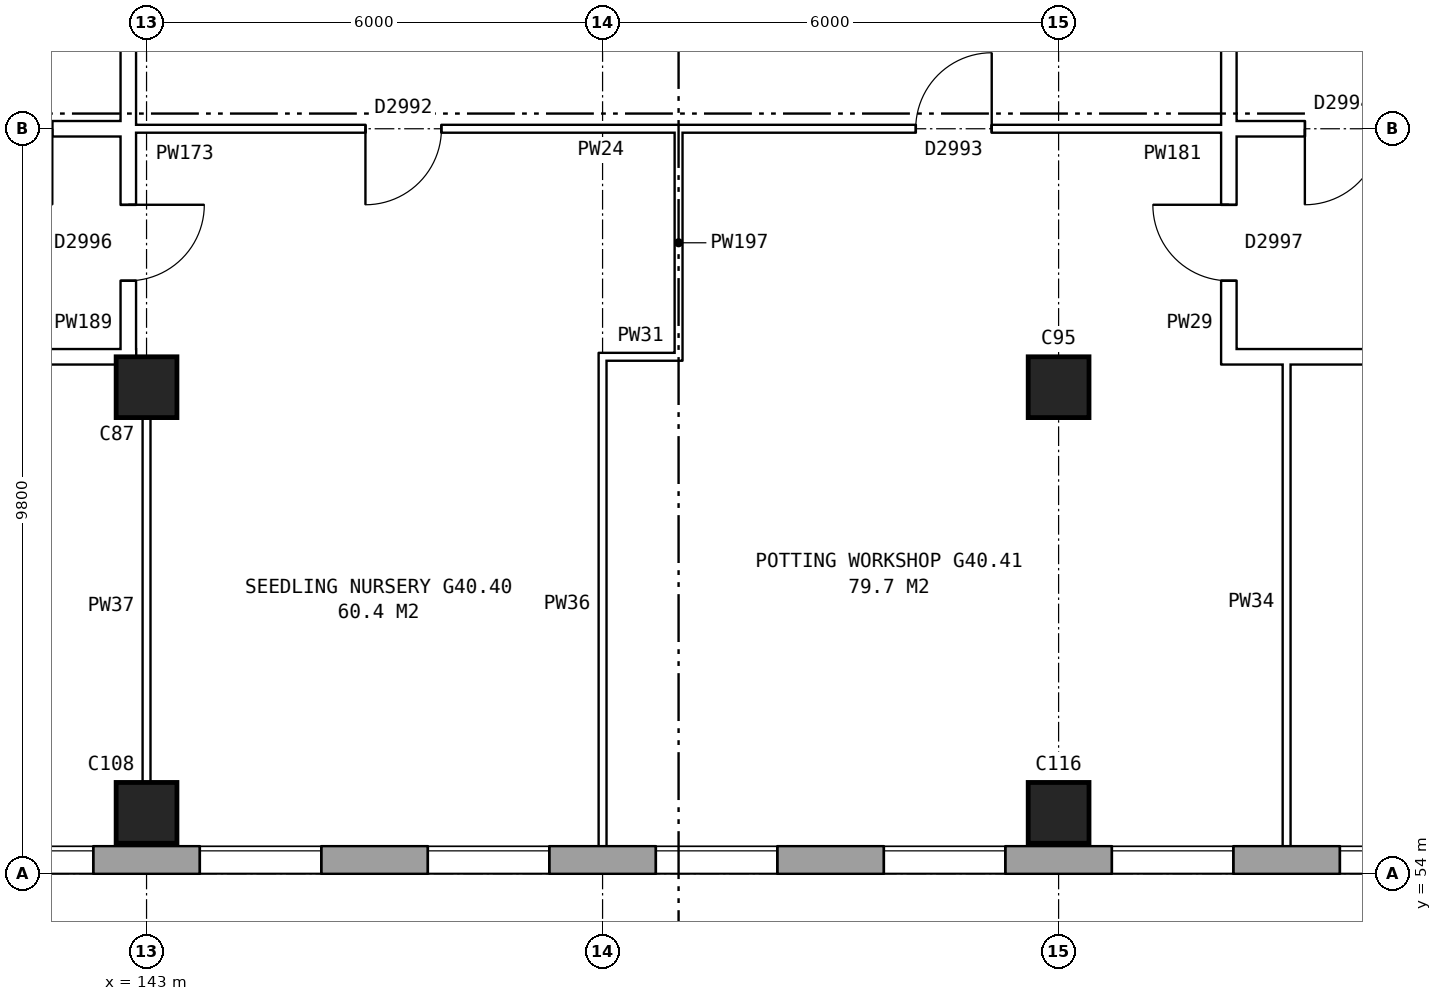
"""IFC4 building model, lengths in metres.
Left out: names, types, materials, properties, quantities, classifications, styles, units other than length and angle.
Written with IfcOpenShell. Run it as: python <this file> out.ifc"""

import sys

from ifc_helpers import new_model, si_unit, direction, frame, frame_2d, origin, origin_2d, place, context, subcontext, project, spatial, rectangle, extrude, element, fill, save


model = new_model("IFC4")
c1 = context("Model", 3, precision=1e-05, world=origin(), true_north=direction((0.0, 1.0)))
c2 = subcontext(c1, "Body", "Model", "MODEL_VIEW")
j1 = project(units=[si_unit("LENGTHUNIT", "METRE"), si_unit("PLANEANGLEUNIT", "RADIAN")], contexts=[c1])
p1 = place(None, origin())
s1 = spatial("IfcSite", under=j1, at=p1, CompositionType="ELEMENT")
p2 = place(p1, origin())
s2 = spatial("IfcBuilding", under=s1, at=p2, CompositionType="ELEMENT")
p3 = place(p2, frame((0.0, 0.0, 142.3)))
s3 = spatial("IfcBuildingStorey", under=s2, at=p3, CompositionType="ELEMENT", Elevation=142.3)
for number, where, z_axis, x_axis in (
    (1, (143.0, 54.8, 0.0), (0.0, 0.0, 1.0), (1.0, 0.0, 0.0)),
    (2, (143.0, 60.4, 0.0), (0.0, 0.0, 1.0), (1.0, 0.0, 0.0)),
    (3, (155.0, 54.8, 0.0), (0.0, 0.0, 1.0), (1.0, 0.0, 0.0)),
    (4, (155.0, 60.4, 0.0), (0.0, 0.0, 1.0), (1.0, 0.0, 0.0)),
):
    element("IfcColumn", number, at=place(p3, frame(where, z_axis=z_axis, x_axis=x_axis)), inside=s3, PredefinedType="COLUMN", context=c2, shape_type="SweptSolid", body=[
        extrude(rectangle(XDim=0.8, YDim=0.8, at=origin_2d()), origin(), (0.0, 0.0, 1.0), 5.6),
    ])
p4 = place(p3, frame((134.075, 54.18, 0.0), z_axis=(0.0, 0.0, 1.0), x_axis=(1.0, 0.0, 0.0)))
e5 = element("IfcWall", 5, at=p4, inside=s3, PredefinedType="STANDARD", context=c2, shape_type="SweptSolid", body=[
    extrude(rectangle(XDim=34.351, YDim=0.36, at=frame_2d((17.175, 0.0))), origin(), (0.0, 0.0, 1.0), 5.6),
])
p5 = place(p4, frame((0.625, 0.0, 0.15)))
e6 = element("IfcOpeningElement", 6, at=p5, cuts=e5, PredefinedType="OPENING", context=c2, shape_type="SweptSolid", body=[
    extrude(rectangle(XDim=1.6, YDim=2.4, at=frame_2d((0.8, 1.2))), frame((0.0, 0.19, 0.0), z_axis=(0.0, -1.0, 0.0), x_axis=(1.0, 0.0, 0.0)), (0.0, 0.0, 1.0), 0.38),
])
p6 = place(p4, frame((3.625, 0.0, 0.15)))
e7 = element("IfcOpeningElement", 7, at=p6, cuts=e5, PredefinedType="OPENING", context=c2, shape_type="SweptSolid", body=[
    extrude(rectangle(XDim=1.6, YDim=2.4, at=frame_2d((0.8, 1.2))), frame((0.0, 0.19, 0.0), z_axis=(0.0, -1.0, 0.0), x_axis=(1.0, 0.0, 0.0)), (0.0, 0.0, 1.0), 0.38),
])
p7 = place(p4, frame((6.625, 0.0, 0.15)))
e8 = element("IfcOpeningElement", 8, at=p7, cuts=e5, PredefinedType="OPENING", context=c2, shape_type="SweptSolid", body=[
    extrude(rectangle(XDim=1.6, YDim=2.4, at=frame_2d((0.8, 1.2))), frame((0.0, 0.19, 0.0), z_axis=(0.0, -1.0, 0.0), x_axis=(1.0, 0.0, 0.0)), (0.0, 0.0, 1.0), 0.38),
])
p8 = place(p4, frame((9.625, 0.0, 0.15)))
e9 = element("IfcOpeningElement", 9, at=p8, cuts=e5, PredefinedType="OPENING", context=c2, shape_type="SweptSolid", body=[
    extrude(rectangle(XDim=1.6, YDim=2.4, at=frame_2d((0.8, 1.2))), frame((0.0, 0.19, 0.0), z_axis=(0.0, -1.0, 0.0), x_axis=(1.0, 0.0, 0.0)), (0.0, 0.0, 1.0), 0.38),
])
p9 = place(p4, frame((12.625, 0.0, 0.15)))
e10 = element("IfcOpeningElement", 10, at=p9, cuts=e5, PredefinedType="OPENING", context=c2, shape_type="SweptSolid", body=[
    extrude(rectangle(XDim=1.6, YDim=2.4, at=frame_2d((0.8, 1.2))), frame((0.0, 0.19, 0.0), z_axis=(0.0, -1.0, 0.0), x_axis=(1.0, 0.0, 0.0)), (0.0, 0.0, 1.0), 0.38),
])
p10 = place(p4, frame((15.625, 0.0, 0.15)))
e11 = element("IfcOpeningElement", 11, at=p10, cuts=e5, PredefinedType="OPENING", context=c2, shape_type="SweptSolid", body=[
    extrude(rectangle(XDim=1.6, YDim=2.4, at=frame_2d((0.8, 1.2))), frame((0.0, 0.19, 0.0), z_axis=(0.0, -1.0, 0.0), x_axis=(1.0, 0.0, 0.0)), (0.0, 0.0, 1.0), 0.38),
])
p11 = place(p4, frame((18.625, 0.0, 0.15)))
e12 = element("IfcOpeningElement", 12, at=p11, cuts=e5, PredefinedType="OPENING", context=c2, shape_type="SweptSolid", body=[
    extrude(rectangle(XDim=1.6, YDim=2.4, at=frame_2d((0.8, 1.2))), frame((0.0, 0.19, 0.0), z_axis=(0.0, -1.0, 0.0), x_axis=(1.0, 0.0, 0.0)), (0.0, 0.0, 1.0), 0.38),
])
p12 = place(p4, frame((21.625, 0.0, 0.15)))
e13 = element("IfcOpeningElement", 13, at=p12, cuts=e5, PredefinedType="OPENING", context=c2, shape_type="SweptSolid", body=[
    extrude(rectangle(XDim=1.6, YDim=2.4, at=frame_2d((0.8, 1.2))), frame((0.0, 0.19, 0.0), z_axis=(0.0, -1.0, 0.0), x_axis=(1.0, 0.0, 0.0)), (0.0, 0.0, 1.0), 0.38),
])
p13 = place(p4, frame((24.625, 0.0, 0.15)))
e14 = element("IfcOpeningElement", 14, at=p13, cuts=e5, PredefinedType="OPENING", context=c2, shape_type="SweptSolid", body=[
    extrude(rectangle(XDim=1.6, YDim=2.4, at=frame_2d((0.8, 1.2))), frame((0.0, 0.19, 0.0), z_axis=(0.0, -1.0, 0.0), x_axis=(1.0, 0.0, 0.0)), (0.0, 0.0, 1.0), 0.38),
])
p14 = place(p4, frame((27.625, 0.0, 0.15)))
e15 = element("IfcOpeningElement", 15, at=p14, cuts=e5, PredefinedType="OPENING", context=c2, shape_type="SweptSolid", body=[
    extrude(rectangle(XDim=1.6, YDim=2.4, at=frame_2d((0.8, 1.2))), frame((0.0, 0.19, 0.0), z_axis=(0.0, -1.0, 0.0), x_axis=(1.0, 0.0, 0.0)), (0.0, 0.0, 1.0), 0.38),
])
p15 = place(p4, frame((30.625, 0.0, 0.15)))
e16 = element("IfcOpeningElement", 16, at=p15, cuts=e5, PredefinedType="OPENING", context=c2, shape_type="SweptSolid", body=[
    extrude(rectangle(XDim=1.6, YDim=2.4, at=frame_2d((0.8, 1.2))), frame((0.0, 0.19, 0.0), z_axis=(0.0, -1.0, 0.0), x_axis=(1.0, 0.0, 0.0)), (0.0, 0.0, 1.0), 0.38),
])
p16 = place(p3, frame((142.76, 63.9, 0.0), z_axis=(0.0, 0.0, 1.0), x_axis=(0.0, 1.0, 0.0)))
e17 = element("IfcWall", 17, at=p16, inside=s3, PredefinedType="PARTITIONING", context=c2, shape_type="SweptSolid", body=[
    extrude(rectangle(XDim=12.2, YDim=0.2, at=frame_2d((6.1, 0.0))), origin(), (0.0, 0.0, 1.0), 5.6),
])
p17 = place(p16, frame((5.1, 0.0, 0.0)))
e18 = element("IfcOpeningElement", 18, at=p17, cuts=e17, PredefinedType="OPENING", context=c2, shape_type="SweptSolid", body=[
    extrude(rectangle(XDim=2.0, YDim=2.1, at=frame_2d((1.0, 1.05))), frame((0.0, 0.11, 0.0), z_axis=(0.0, -1.0, 0.0), x_axis=(1.0, 0.0, 0.0)), (0.0, 0.0, 1.0), 0.22),
])
p18 = place(p3, frame((157.24, 63.9, 0.0), z_axis=(0.0, 0.0, 1.0), x_axis=(0.0, 1.0, 0.0)))
e19 = element("IfcWall", 19, at=p18, inside=s3, PredefinedType="PARTITIONING", context=c2, shape_type="SweptSolid", body=[
    extrude(rectangle(XDim=12.2, YDim=0.2, at=frame_2d((6.1, 0.0))), origin(), (0.0, 0.0, 1.0), 5.6),
])
p19 = place(p18, frame((5.1, 0.0, 0.0)))
e20 = element("IfcOpeningElement", 20, at=p19, cuts=e19, PredefinedType="OPENING", context=c2, shape_type="SweptSolid", body=[
    extrude(rectangle(XDim=2.0, YDim=2.1, at=frame_2d((1.0, 1.05))), frame((0.0, 0.11, 0.0), z_axis=(0.0, -1.0, 0.0), x_axis=(1.0, 0.0, 0.0)), (0.0, 0.0, 1.0), 0.22),
])
p20 = place(p3, frame((131.24, 60.8, 0.0), z_axis=(0.0, 0.0, 1.0), x_axis=(1.0, 0.0, 0.0)))
e21 = element("IfcWall", 21, at=p20, inside=s3, PredefinedType="PARTITIONING", context=c2, shape_type="SweptSolid", body=[
    extrude(rectangle(XDim=11.622, YDim=0.2, at=frame_2d((5.811, 0.0))), origin(), (0.0, 0.0, 1.0), 5.6),
])
p21 = place(p20, frame((2.44, 0.0, 0.0)))
e22 = element("IfcOpeningElement", 22, at=p21, cuts=e21, PredefinedType="OPENING", context=c2, shape_type="SweptSolid", body=[
    extrude(rectangle(XDim=1.0, YDim=2.1, at=frame_2d((0.5, 1.05))), frame((0.0, 0.11, 0.0), z_axis=(0.0, -1.0, 0.0), x_axis=(1.0, 0.0, 0.0)), (0.0, 0.0, 1.0), 0.22),
])
p22 = place(p20, frame((8.141, 0.0, 0.0)))
e23 = element("IfcOpeningElement", 23, at=p22, cuts=e21, PredefinedType="OPENING", context=c2, shape_type="SweptSolid", body=[
    extrude(rectangle(XDim=1.0, YDim=2.1, at=frame_2d((0.5, 1.05))), frame((0.0, 0.11, 0.0), z_axis=(0.0, -1.0, 0.0), x_axis=(1.0, 0.0, 0.0)), (0.0, 0.0, 1.0), 0.22),
])
p23 = place(p3, frame((157.14, 60.8, 0.0), z_axis=(0.0, 0.0, 1.0), x_axis=(1.0, 0.0, 0.0)))
e24 = element("IfcWall", 24, at=p23, inside=s3, PredefinedType="PARTITIONING", context=c2, shape_type="SweptSolid", body=[
    extrude(rectangle(XDim=14.12, YDim=0.2, at=frame_2d((7.06, 0.0))), origin(), (0.0, 0.0, 1.0), 5.6),
])
p24 = place(p23, frame((3.36, 0.0, 0.0)))
e25 = element("IfcOpeningElement", 25, at=p24, cuts=e24, PredefinedType="OPENING", context=c2, shape_type="SweptSolid", body=[
    extrude(rectangle(XDim=1.0, YDim=2.1, at=frame_2d((0.5, 1.05))), frame((0.0, 0.11, 0.0), z_axis=(0.0, -1.0, 0.0), x_axis=(1.0, 0.0, 0.0)), (0.0, 0.0, 1.0), 0.22),
])
p25 = place(p23, frame((10.63, 0.0, 0.0)))
e26 = element("IfcOpeningElement", 26, at=p25, cuts=e24, PredefinedType="OPENING", context=c2, shape_type="SweptSolid", body=[
    extrude(rectangle(XDim=1.0, YDim=2.1, at=frame_2d((0.5, 1.05))), frame((0.0, 0.11, 0.0), z_axis=(0.0, -1.0, 0.0), x_axis=(1.0, 0.0, 0.0)), (0.0, 0.0, 1.0), 0.22),
])
p26 = place(p3, frame((148.95, 60.8, 0.0), z_axis=(0.0, 0.0, 1.0), x_axis=(1.0, 0.0, 0.0)))
e27 = element("IfcWall", 27, at=p26, inside=s3, PredefinedType="PARTITIONING", context=c2, shape_type="SweptSolid", body=[
    extrude(rectangle(XDim=1.1, YDim=0.1, at=frame_2d((0.55, 0.0))), origin(), (0.0, 0.0, 1.0), 5.6),
])
p27 = place(p3, frame((139.76, 63.8, 0.0), z_axis=(0.0, 0.0, 1.0), x_axis=(1.0, 0.0, 0.0)))
e28 = element("IfcWall", 28, at=p27, inside=s3, PredefinedType="PARTITIONING", context=c2, shape_type="SweptSolid", body=[
    extrude(rectangle(XDim=3.1, YDim=0.2, at=frame_2d((1.55, 0.0))), origin(), (0.0, 0.0, 1.0), 5.6),
])
p28 = place(p27, frame((1.0, 0.0, 0.0)))
e29 = element("IfcOpeningElement", 29, at=p28, cuts=e28, PredefinedType="OPENING", context=c2, shape_type="SweptSolid", body=[
    extrude(rectangle(XDim=1.0, YDim=2.1, at=frame_2d((0.5, 1.05))), frame((0.0, 0.11, 0.0), z_axis=(0.0, -1.0, 0.0), x_axis=(1.0, 0.0, 0.0)), (0.0, 0.0, 1.0), 0.22),
])
p29 = place(p3, frame((157.14, 63.8, 0.0), z_axis=(0.0, 0.0, 1.0), x_axis=(1.0, 0.0, 0.0)))
e30 = element("IfcWall", 30, at=p29, inside=s3, PredefinedType="PARTITIONING", context=c2, shape_type="SweptSolid", body=[
    extrude(rectangle(XDim=3.1, YDim=0.2, at=frame_2d((1.55, 0.0))), origin(), (0.0, 0.0, 1.0), 5.6),
])
p30 = place(p29, frame((1.1, 0.0, 0.0)))
e31 = element("IfcOpeningElement", 31, at=p30, cuts=e30, PredefinedType="OPENING", context=c2, shape_type="SweptSolid", body=[
    extrude(rectangle(XDim=1.0, YDim=2.1, at=frame_2d((0.5, 1.05))), frame((0.0, 0.11, 0.0), z_axis=(0.0, -1.0, 0.0), x_axis=(1.0, 0.0, 0.0)), (0.0, 0.0, 1.0), 0.22),
])
p31 = place(p3, frame((142.66, 63.8, 0.0), z_axis=(0.0, 0.0, 1.0), x_axis=(1.0, 0.0, 0.0)))
e32 = element("IfcWall", 32, at=p31, inside=s3, PredefinedType="PARTITIONING", context=c2, shape_type="SweptSolid", body=[
    extrude(rectangle(XDim=14.68, YDim=0.1, at=frame_2d((7.34, 0.0))), origin(), (0.0, 0.0, 1.0), 5.6),
])
p32 = place(p31, frame((3.22, 0.0, 0.0)))
e33 = element("IfcOpeningElement", 33, at=p32, cuts=e32, PredefinedType="OPENING", context=c2, shape_type="SweptSolid", body=[
    extrude(rectangle(XDim=1.0, YDim=2.1, at=frame_2d((0.5, 1.05))), frame((0.0, 0.06, 0.0), z_axis=(0.0, -1.0, 0.0), x_axis=(1.0, 0.0, 0.0)), (0.0, 0.0, 1.0), 0.12),
])
p33 = place(p31, frame((10.46, 0.0, 0.0)))
e34 = element("IfcOpeningElement", 34, at=p33, cuts=e32, PredefinedType="OPENING", context=c2, shape_type="SweptSolid", body=[
    extrude(rectangle(XDim=1.0, YDim=2.1, at=frame_2d((0.5, 1.05))), frame((0.0, 0.06, 0.0), z_axis=(0.0, -1.0, 0.0), x_axis=(1.0, 0.0, 0.0)), (0.0, 0.0, 1.0), 0.12),
])
p34 = place(p3, frame((142.76, 60.7, 0.0), z_axis=(0.0, 0.0, 1.0), x_axis=(0.0, 1.0, 0.0)))
e35 = element("IfcWall", 35, at=p34, inside=s3, PredefinedType="PARTITIONING", context=c2, shape_type="SweptSolid", body=[
    extrude(rectangle(XDim=3.2, YDim=0.2, at=frame_2d((1.6, 0.0))), origin(), (0.0, 0.0, 1.0), 5.6),
])
p35 = place(p34, frame((1.1, 0.0, 0.0)))
e36 = element("IfcOpeningElement", 36, at=p35, cuts=e35, PredefinedType="OPENING", context=c2, shape_type="SweptSolid", body=[
    extrude(rectangle(XDim=1.0, YDim=2.1, at=frame_2d((0.5, 1.05))), frame((0.0, 0.11, 0.0), z_axis=(0.0, -1.0, 0.0), x_axis=(1.0, 0.0, 0.0)), (0.0, 0.0, 1.0), 0.22),
])
p36 = place(p3, frame((143.0, 54.24, 0.0), z_axis=(0.0, 0.0, 1.0), x_axis=(0.0, 1.0, 0.0)))
e37 = element("IfcWall", 37, at=p36, inside=s3, PredefinedType="PARTITIONING", context=c2, shape_type="SweptSolid", body=[
    extrude(rectangle(XDim=6.56, YDim=0.1, at=frame_2d((3.28, 0.0))), origin(), (0.0, 0.0, 1.0), 5.6),
])
p37 = place(p3, frame((149.0, 54.24, 0.0), z_axis=(0.0, 0.0, 1.0), x_axis=(0.0, 1.0, 0.0)))
e38 = element("IfcWall", 38, at=p37, inside=s3, PredefinedType="PARTITIONING", context=c2, shape_type="SweptSolid", body=[
    extrude(rectangle(XDim=6.61, YDim=0.1, at=frame_2d((3.305, 0.0))), origin(), (0.0, 0.0, 1.0), 5.6),
])
p38 = place(p3, frame((150.0, 60.75, 0.0), z_axis=(0.0, 0.0, 1.0), x_axis=(0.0, 1.0, 0.0)))
e39 = element("IfcWall", 39, at=p38, inside=s3, PredefinedType="PARTITIONING", context=c2, shape_type="SweptSolid", body=[
    extrude(rectangle(XDim=3.1, YDim=0.1, at=frame_2d((1.55, 0.0))), origin(), (0.0, 0.0, 1.0), 5.6),
])
p39 = place(p3, frame((157.24, 60.7, 0.0), z_axis=(0.0, 0.0, 1.0), x_axis=(0.0, 1.0, 0.0)))
e40 = element("IfcWall", 40, at=p39, inside=s3, PredefinedType="PARTITIONING", context=c2, shape_type="SweptSolid", body=[
    extrude(rectangle(XDim=3.2, YDim=0.2, at=frame_2d((1.6, 0.0))), origin(), (0.0, 0.0, 1.0), 5.6),
])
p40 = place(p39, frame((1.1, 0.0, 0.0)))
e41 = element("IfcOpeningElement", 41, at=p40, cuts=e40, PredefinedType="OPENING", context=c2, shape_type="SweptSolid", body=[
    extrude(rectangle(XDim=1.0, YDim=2.1, at=frame_2d((0.5, 1.05))), frame((0.0, 0.11, 0.0), z_axis=(0.0, -1.0, 0.0), x_axis=(1.0, 0.0, 0.0)), (0.0, 0.0, 1.0), 0.22),
])
p41 = place(p3, frame((158.0, 54.24, 0.0), z_axis=(0.0, 0.0, 1.0), x_axis=(0.0, 1.0, 0.0)))
e42 = element("IfcWall", 42, at=p41, inside=s3, PredefinedType="PARTITIONING", context=c2, shape_type="SweptSolid", body=[
    extrude(rectangle(XDim=6.66, YDim=0.1, at=frame_2d((3.33, 0.0))), origin(), (0.0, 0.0, 1.0), 5.6),
])
p42 = place(p7, origin())
e43 = element("IfcWindow", 43, at=p42, inside=s3, PartitioningType="SINGLE_PANEL", PredefinedType="WINDOW", context=c2, shape_type="SweptSolid", body=[
    extrude(rectangle(XDim=1.6, YDim=2.4, at=frame_2d((0.8, 1.2))), frame((0.0, 0.15, 0.0), z_axis=(0.0, -1.0, 0.0), x_axis=(1.0, 0.0, 0.0)), (0.0, 0.0, 1.0), 0.06),
])
fill(e8, e43)
p43 = place(p8, origin())
e44 = element("IfcWindow", 44, at=p43, inside=s3, PartitioningType="SINGLE_PANEL", PredefinedType="WINDOW", context=c2, shape_type="SweptSolid", body=[
    extrude(rectangle(XDim=1.6, YDim=2.4, at=frame_2d((0.8, 1.2))), frame((0.0, 0.15, 0.0), z_axis=(0.0, -1.0, 0.0), x_axis=(1.0, 0.0, 0.0)), (0.0, 0.0, 1.0), 0.06),
])
fill(e9, e44)
p44 = place(p9, origin())
e45 = element("IfcWindow", 45, at=p44, inside=s3, PartitioningType="SINGLE_PANEL", PredefinedType="WINDOW", context=c2, shape_type="SweptSolid", body=[
    extrude(rectangle(XDim=1.6, YDim=2.4, at=frame_2d((0.8, 1.2))), frame((0.0, 0.15, 0.0), z_axis=(0.0, -1.0, 0.0), x_axis=(1.0, 0.0, 0.0)), (0.0, 0.0, 1.0), 0.06),
])
fill(e10, e45)
p45 = place(p10, origin())
e46 = element("IfcWindow", 46, at=p45, inside=s3, PartitioningType="SINGLE_PANEL", PredefinedType="WINDOW", context=c2, shape_type="SweptSolid", body=[
    extrude(rectangle(XDim=1.6, YDim=2.4, at=frame_2d((0.8, 1.2))), frame((0.0, 0.15, 0.0), z_axis=(0.0, -1.0, 0.0), x_axis=(1.0, 0.0, 0.0)), (0.0, 0.0, 1.0), 0.06),
])
fill(e11, e46)
p46 = place(p11, origin())
e47 = element("IfcWindow", 47, at=p46, inside=s3, PartitioningType="SINGLE_PANEL", PredefinedType="WINDOW", context=c2, shape_type="SweptSolid", body=[
    extrude(rectangle(XDim=1.6, YDim=2.4, at=frame_2d((0.8, 1.2))), frame((0.0, 0.15, 0.0), z_axis=(0.0, -1.0, 0.0), x_axis=(1.0, 0.0, 0.0)), (0.0, 0.0, 1.0), 0.06),
])
fill(e12, e47)
p47 = place(p12, origin())
e48 = element("IfcWindow", 48, at=p47, inside=s3, PartitioningType="SINGLE_PANEL", PredefinedType="WINDOW", context=c2, shape_type="SweptSolid", body=[
    extrude(rectangle(XDim=1.6, YDim=2.4, at=frame_2d((0.8, 1.2))), frame((0.0, 0.15, 0.0), z_axis=(0.0, -1.0, 0.0), x_axis=(1.0, 0.0, 0.0)), (0.0, 0.0, 1.0), 0.06),
])
fill(e13, e48)
p48 = place(p13, origin())
e49 = element("IfcWindow", 49, at=p48, inside=s3, PartitioningType="SINGLE_PANEL", PredefinedType="WINDOW", context=c2, shape_type="SweptSolid", body=[
    extrude(rectangle(XDim=1.6, YDim=2.4, at=frame_2d((0.8, 1.2))), frame((0.0, 0.15, 0.0), z_axis=(0.0, -1.0, 0.0), x_axis=(1.0, 0.0, 0.0)), (0.0, 0.0, 1.0), 0.06),
])
fill(e14, e49)
p49 = place(p30, frame((1.0, 0.0, 0.0), z_axis=(0.0, 0.0, 1.0), x_axis=(-1.0, 0.0, 0.0)))
e50 = element("IfcDoor", 50, at=p49, inside=s3, OperationType="SINGLE_SWING_RIGHT", PredefinedType="DOOR", context=c2, shape_type="SweptSolid", body=[
    extrude(rectangle(XDim=1.0, YDim=2.1, at=frame_2d((0.5, 1.05))), frame((0.0, 0.025, 0.0), z_axis=(0.0, -1.0, 0.0), x_axis=(1.0, 0.0, 0.0)), (0.0, 0.0, 1.0), 0.05),
])
fill(e31, e50)
p50 = place(p32, frame((1.0, 0.0, 0.0), z_axis=(0.0, 0.0, 1.0), x_axis=(-1.0, 0.0, 0.0)))
e51 = element("IfcDoor", 51, at=p50, inside=s3, OperationType="SINGLE_SWING_RIGHT", PredefinedType="DOOR", context=c2, shape_type="SweptSolid", body=[
    extrude(rectangle(XDim=1.0, YDim=2.1, at=frame_2d((0.5, 1.05))), frame((0.0, 0.025, 0.0), z_axis=(0.0, -1.0, 0.0), x_axis=(1.0, 0.0, 0.0)), (0.0, 0.0, 1.0), 0.05),
])
fill(e33, e51)
p51 = place(p33, origin())
e52 = element("IfcDoor", 52, at=p51, inside=s3, OperationType="SINGLE_SWING_RIGHT", PredefinedType="DOOR", context=c2, shape_type="SweptSolid", body=[
    extrude(rectangle(XDim=1.0, YDim=2.1, at=frame_2d((0.5, 1.05))), frame((0.0, 0.025, 0.0), z_axis=(0.0, -1.0, 0.0), x_axis=(1.0, 0.0, 0.0)), (0.0, 0.0, 1.0), 0.05),
])
fill(e34, e52)
p52 = place(p35, frame((1.0, 0.0, 0.0), z_axis=(0.0, 0.0, 1.0), x_axis=(-1.0, 0.0, 0.0)))
e53 = element("IfcDoor", 53, at=p52, inside=s3, OperationType="SINGLE_SWING_LEFT", PredefinedType="DOOR", context=c2, shape_type="SweptSolid", body=[
    extrude(rectangle(XDim=1.0, YDim=2.1, at=frame_2d((0.5, 1.05))), frame((0.0, 0.025, 0.0), z_axis=(0.0, -1.0, 0.0), x_axis=(1.0, 0.0, 0.0)), (0.0, 0.0, 1.0), 0.05),
])
fill(e36, e53)
p53 = place(p40, origin())
e54 = element("IfcDoor", 54, at=p53, inside=s3, OperationType="SINGLE_SWING_RIGHT", PredefinedType="DOOR", context=c2, shape_type="SweptSolid", body=[
    extrude(rectangle(XDim=1.0, YDim=2.1, at=frame_2d((0.5, 1.05))), frame((0.0, 0.025, 0.0), z_axis=(0.0, -1.0, 0.0), x_axis=(1.0, 0.0, 0.0)), (0.0, 0.0, 1.0), 0.05),
])
fill(e41, e54)
save(model, sys.argv[1])
